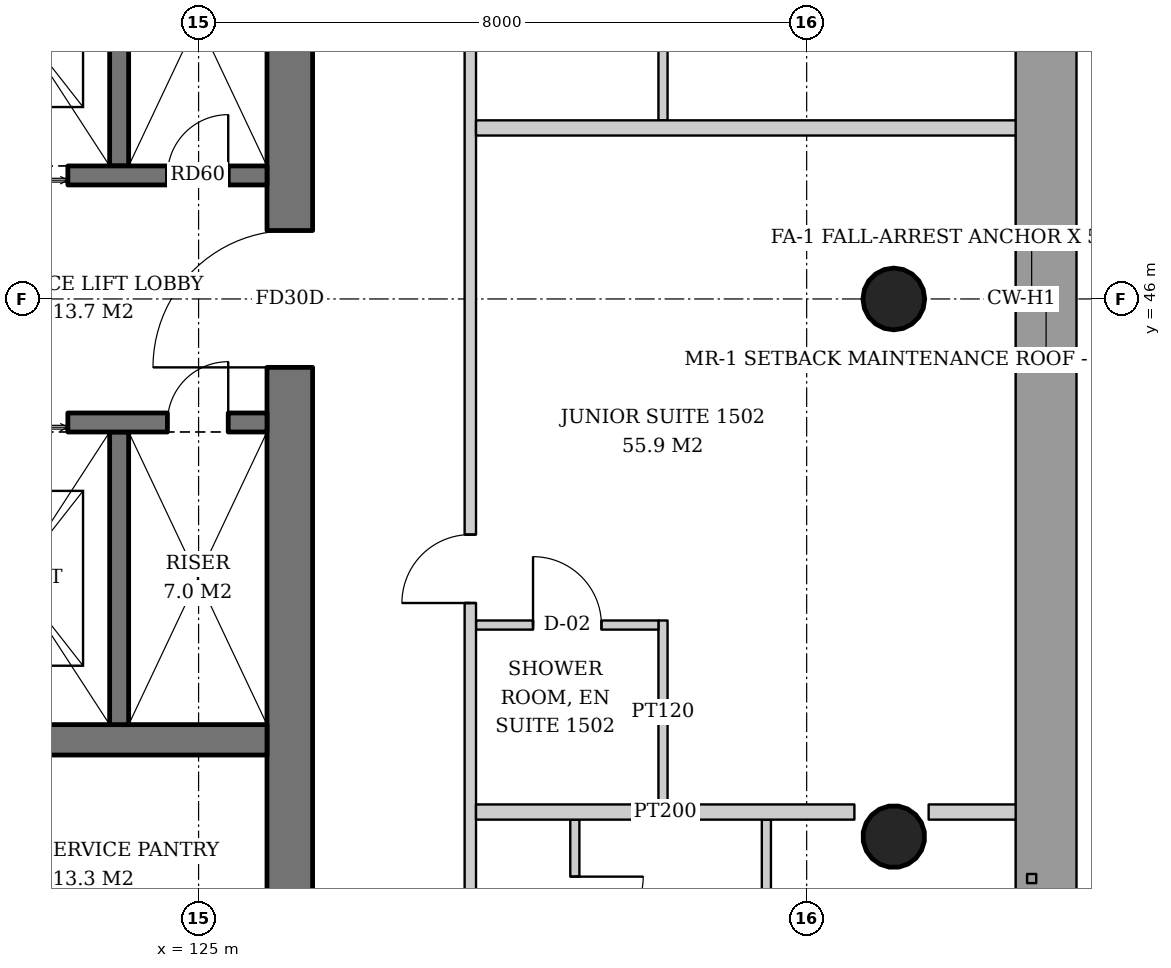
"""IFC4 building model, lengths in metres.
Left out: names, types, materials, properties, quantities, classifications, styles, units other than length and angle.
Written with IfcOpenShell. Run it as: python <this file> out.ifc"""

import sys

from ifc_helpers import new_model, si_unit, direction, frame, frame_2d, origin, origin_2d, place, context, subcontext, project, spatial, rectangle, hollow_circle, extrude, element, fill, save


model = new_model("IFC4")
c1 = context("Model", 3, precision=1e-05, world=origin(), true_north=direction((0.0, 1.0)))
c2 = subcontext(c1, "Body", "Model", "MODEL_VIEW")
j1 = project(units=[si_unit("LENGTHUNIT", "METRE"), si_unit("PLANEANGLEUNIT", "RADIAN")], contexts=[c1])
p1 = place(None, origin())
s1 = spatial("IfcSite", under=j1, at=p1, CompositionType="ELEMENT")
p2 = place(p1, origin())
s2 = spatial("IfcBuilding", under=s1, at=p2, CompositionType="ELEMENT")
p3 = place(p2, frame((0.0, 0.0, 62.8)))
s3 = spatial("IfcBuildingStorey", under=s2, at=p3, CompositionType="ELEMENT", Elevation=62.8)
p4 = place(p3, frame((134.198, 38.901, 0.0), z_axis=(-0.043059584825, 0.021497706284, 0.998841188968), x_axis=(-0.446680166538, -0.894693706707, 0.0)))
e1 = element("IfcColumn", 1, at=p4, inside=s3, PredefinedType="COLUMN", context=c2, shape_type="SweptSolid", body=[
    extrude(hollow_circle(Radius=0.406, WallThickness=0.03, at=origin_2d()), origin(), (0.0, 0.0, 1.0), 3.804),
])
p5 = place(p3, frame((134.198, 46.0, 0.0), z_axis=(-0.043069538298, 0.0, 0.999072076915), x_axis=(0.0, -1.0, 0.0)))
e2 = element("IfcColumn", 2, at=p5, inside=s3, PredefinedType="COLUMN", context=c2, shape_type="SweptSolid", body=[
    extrude(hollow_circle(Radius=0.406, WallThickness=0.03, at=origin_2d()), origin(), (0.0, 0.0, 1.0), 3.803),
])
p6 = place(p3, frame((126.2, 37.1, 0.0), z_axis=(0.0, 0.0, 1.0), x_axis=(0.0, 1.0, 0.0)))
e3 = element("IfcWall", 3, at=p6, inside=s3, PredefinedType="SHEAR", context=c2, shape_type="SweptSolid", body=[
    extrude(rectangle(XDim=17.8, YDim=0.6, at=frame_2d((8.9, 0.0))), origin(), (0.0, 0.0, 1.0), 3.8),
])
p7 = place(p6, frame((8.0, 0.0, 0.0)))
e4 = element("IfcOpeningElement", 4, at=p7, cuts=e3, PredefinedType="OPENING", context=c2, shape_type="SweptSolid", body=[
    extrude(rectangle(XDim=1.8, YDim=2.4, at=frame_2d((0.9, 1.2))), frame((0.0, 0.31, 0.0), z_axis=(0.0, -1.0, 0.0), x_axis=(1.0, 0.0, 0.0)), (0.0, 0.0, 1.0), 0.62),
])
p8 = place(p3, frame((108.1, 40.2, 0.0), z_axis=(0.0, 0.0, 1.0), x_axis=(1.0, 0.0, 0.0)))
e5 = element("IfcWall", 5, at=p8, inside=s3, PredefinedType="SHEAR", context=c2, shape_type="SweptSolid", body=[
    extrude(rectangle(XDim=17.8, YDim=0.4, at=frame_2d((8.9, 0.0))), origin(), (0.0, 0.0, 1.0), 3.8),
])
p9 = place(p3, frame((123.955, 47.75, 0.0), z_axis=(0.0, 0.0, 1.0), x_axis=(0.0, 1.0, 0.0)))
e6 = element("IfcWall", 6, at=p9, inside=s3, PredefinedType="SHEAR", context=c2, shape_type="SweptSolid", body=[
    extrude(rectangle(XDim=3.85, YDim=0.25, at=frame_2d((1.925, 0.0))), origin(), (0.0, 0.0, 1.0), 3.8),
])
p10 = place(p3, frame((121.33, 47.625, 0.0), z_axis=(0.0, 0.0, 1.0), x_axis=(1.0, 0.0, 0.0)))
e7 = element("IfcWall", 7, at=p10, inside=s3, PredefinedType="SHEAR", context=c2, shape_type="SweptSolid", body=[
    extrude(rectangle(XDim=4.57, YDim=0.25, at=frame_2d((2.285, 0.0))), origin(), (0.0, 0.0, 1.0), 3.8),
])
p11 = place(p10, frame((0.55, 0.0, 0.0)))
e8 = element("IfcOpeningElement", 8, at=p11, cuts=e7, PredefinedType="OPENING", context=c2, shape_type="SweptSolid", body=[
    extrude(rectangle(XDim=1.4, YDim=2.4, at=frame_2d((0.7, 1.2))), frame((0.0, 0.135, 0.0), z_axis=(0.0, -1.0, 0.0), x_axis=(1.0, 0.0, 0.0)), (0.0, 0.0, 1.0), 0.27),
])
p12 = place(p10, frame((3.26, 0.0, 0.0)))
e9 = element("IfcOpeningElement", 9, at=p12, cuts=e7, PredefinedType="OPENING", context=c2, shape_type="SweptSolid", body=[
    extrude(rectangle(XDim=0.8, YDim=2.0, at=frame_2d((0.4, 1.0))), frame((0.0, 0.135, 0.0), z_axis=(0.0, -1.0, 0.0), x_axis=(1.0, 0.0, 0.0)), (0.0, 0.0, 1.0), 0.27),
])
p13 = place(p3, frame((123.955, 44.25, 0.0), z_axis=(0.0, 0.0, 1.0), x_axis=(0.0, -1.0, 0.0)))
e10 = element("IfcWall", 10, at=p13, inside=s3, PredefinedType="SHEAR", context=c2, shape_type="SweptSolid", body=[
    extrude(rectangle(XDim=3.85, YDim=0.25, at=frame_2d((1.925, 0.0))), origin(), (0.0, 0.0, 1.0), 3.8),
])
p14 = place(p3, frame((121.33, 44.375, 0.0), z_axis=(0.0, 0.0, 1.0), x_axis=(1.0, 0.0, 0.0)))
e11 = element("IfcWall", 11, at=p14, inside=s3, PredefinedType="SHEAR", context=c2, shape_type="SweptSolid", body=[
    extrude(rectangle(XDim=4.57, YDim=0.25, at=frame_2d((2.285, 0.0))), origin(), (0.0, 0.0, 1.0), 3.8),
])
p15 = place(p14, frame((0.55, 0.0, 0.0)))
e12 = element("IfcOpeningElement", 12, at=p15, cuts=e11, PredefinedType="OPENING", context=c2, shape_type="SweptSolid", body=[
    extrude(rectangle(XDim=1.4, YDim=2.4, at=frame_2d((0.7, 1.2))), frame((0.0, 0.135, 0.0), z_axis=(0.0, -1.0, 0.0), x_axis=(1.0, 0.0, 0.0)), (0.0, 0.0, 1.0), 0.27),
])
p16 = place(p14, frame((3.26, 0.0, 0.0)))
e13 = element("IfcOpeningElement", 13, at=p16, cuts=e11, PredefinedType="OPENING", context=c2, shape_type="SweptSolid", body=[
    extrude(rectangle(XDim=0.8, YDim=2.0, at=frame_2d((0.4, 1.0))), frame((0.0, 0.135, 0.0), z_axis=(0.0, -1.0, 0.0), x_axis=(1.0, 0.0, 0.0)), (0.0, 0.0, 1.0), 0.27),
])
p17 = place(p3, frame((129.95, 39.15, 0.0), z_axis=(0.0, 0.0, 1.0), x_axis=(0.0, -1.0, 0.0)))
e14 = element("IfcWall", 14, at=p17, inside=s3, PredefinedType="PARTITIONING", context=c2, shape_type="SweptSolid", body=[
    extrude(rectangle(XDim=2.58, YDim=0.12, at=frame_2d((1.29, 0.0))), origin(), (0.0, 0.0, 1.0), 2.8),
])
p18 = place(p17, frame((0.75, 0.0, 0.0)))
e15 = element("IfcOpeningElement", 15, at=p18, cuts=e14, PredefinedType="OPENING", context=c2, shape_type="SweptSolid", body=[
    extrude(rectangle(XDim=0.9, YDim=2.1, at=frame_2d((0.45, 1.05))), frame((0.0, 0.07, 0.0), z_axis=(0.0, -1.0, 0.0), x_axis=(1.0, 0.0, 0.0)), (0.0, 0.0, 1.0), 0.14),
])
p19 = place(p3, frame((132.47, 39.15, 0.0), z_axis=(0.0, 0.0, 1.0), x_axis=(0.0, -1.0, 0.0)))
e16 = element("IfcWall", 16, at=p19, inside=s3, PredefinedType="PARTITIONING", context=c2, shape_type="SweptSolid", body=[
    extrude(rectangle(XDim=2.58, YDim=0.12, at=frame_2d((1.29, 0.0))), origin(), (0.0, 0.0, 1.0), 2.8),
])
p20 = place(p3, frame((131.11, 39.35, 0.0), z_axis=(0.0, 0.0, 1.0), x_axis=(0.0, 1.0, 0.0)))
e17 = element("IfcWall", 17, at=p20, inside=s3, PredefinedType="PARTITIONING", context=c2, shape_type="SweptSolid", body=[
    extrude(rectangle(XDim=2.42, YDim=0.12, at=frame_2d((1.21, 0.0))), origin(), (0.0, 0.0, 1.0), 2.847),
])
p21 = place(p3, frame((128.65, 41.71, 0.0), z_axis=(0.0, 0.0, 1.0), x_axis=(1.0, 0.0, 0.0)))
e18 = element("IfcWall", 18, at=p21, inside=s3, PredefinedType="PARTITIONING", context=c2, shape_type="SweptSolid", body=[
    extrude(rectangle(XDim=2.4, YDim=0.12, at=frame_2d((1.2, 0.0))), origin(), (0.0, 0.0, 1.0), 3.6),
])
p22 = place(p21, frame((0.75, 0.0, 0.0)))
e19 = element("IfcOpeningElement", 19, at=p22, cuts=e18, PredefinedType="OPENING", context=c2, shape_type="SweptSolid", body=[
    extrude(rectangle(XDim=0.9, YDim=2.1, at=frame_2d((0.45, 1.05))), frame((0.0, 0.07, 0.0), z_axis=(0.0, -1.0, 0.0), x_axis=(1.0, 0.0, 0.0)), (0.0, 0.0, 1.0), 0.14),
])
p23 = place(p3, frame((131.11, 48.35, 0.0), z_axis=(0.0, 0.0, 1.0), x_axis=(0.0, 1.0, 0.0)))
e20 = element("IfcWall", 20, at=p23, inside=s3, PredefinedType="PARTITIONING", context=c2, shape_type="SweptSolid", body=[
    extrude(rectangle(XDim=2.72, YDim=0.12, at=frame_2d((1.36, 0.0))), origin(), (0.0, 0.0, 1.0), 2.847),
])
p24 = place(p3, frame((128.575, 34.35, 0.0), z_axis=(0.0, 0.0, 1.0), x_axis=(0.0, 1.0, 0.0)))
e21 = element("IfcWall", 21, at=p24, inside=s3, PredefinedType="PARTITIONING", context=c2, shape_type="SweptSolid", body=[
    extrude(rectangle(XDim=23.15, YDim=0.15, at=frame_2d((11.575, 0.0))), origin(), (0.0, 0.0, 1.0), 2.8),
])
p25 = place(p24, frame((2.025, 0.0, 0.0)))
e22 = element("IfcOpeningElement", 22, at=p25, cuts=e21, PredefinedType="OPENING", context=c2, shape_type="SweptSolid", body=[
    extrude(rectangle(XDim=0.9, YDim=2.1, at=frame_2d((0.45, 1.05))), frame((0.0, 0.085, 0.0), z_axis=(0.0, -1.0, 0.0), x_axis=(1.0, 0.0, 0.0)), (0.0, 0.0, 1.0), 0.17),
])
p26 = place(p24, frame((7.65, 0.0, 0.0)))
e23 = element("IfcOpeningElement", 23, at=p26, cuts=e21, PredefinedType="OPENING", context=c2, shape_type="SweptSolid", body=[
    extrude(rectangle(XDim=0.9, YDim=2.1, at=frame_2d((0.45, 1.05))), frame((0.0, 0.085, 0.0), z_axis=(0.0, -1.0, 0.0), x_axis=(1.0, 0.0, 0.0)), (0.0, 0.0, 1.0), 0.17),
])
p27 = place(p24, frame((16.9, 0.0, 0.0)))
e24 = element("IfcOpeningElement", 24, at=p27, cuts=e21, PredefinedType="OPENING", context=c2, shape_type="SweptSolid", body=[
    extrude(rectangle(XDim=0.9, YDim=2.1, at=frame_2d((0.45, 1.05))), frame((0.0, 0.085, 0.0), z_axis=(0.0, -1.0, 0.0), x_axis=(1.0, 0.0, 0.0)), (0.0, 0.0, 1.0), 0.17),
])
p28 = place(p3, frame((128.65, 39.25, 0.0), z_axis=(0.0, 0.0, 1.0), x_axis=(1.0, 0.0, 0.0)))
e25 = element("IfcWall", 25, at=p28, inside=s3, PredefinedType="PARTITIONING", context=c2, shape_type="SweptSolid", body=[
    extrude(rectangle(XDim=4.978, YDim=0.2, at=frame_2d((2.489, 0.0))), origin(), (0.0, 0.0, 1.0), 3.6),
])
p29 = place(p3, frame((134.605, 39.25, 0.0), z_axis=(0.0, 0.0, 1.0), x_axis=(1.0, 0.0, 0.0)))
e26 = element("IfcWall", 26, at=p29, inside=s3, PredefinedType="PARTITIONING", context=c2, shape_type="SweptSolid", body=[
    extrude(rectangle(XDim=1.185, YDim=0.2, at=frame_2d((0.593, 0.0))), origin(), (0.0, 0.0, 1.0), 3.6),
])
p30 = place(p3, frame((128.65, 48.25, 0.0), z_axis=(0.0, 0.0, 1.0), x_axis=(1.0, 0.0, 0.0)))
e27 = element("IfcWall", 27, at=p30, inside=s3, PredefinedType="PARTITIONING", context=c2, shape_type="SweptSolid", body=[
    extrude(rectangle(XDim=7.14, YDim=0.2, at=frame_2d((3.57, 0.0))), origin(), (0.0, 0.0, 1.0), 3.05),
])
p31 = place(p11, origin())
e28 = element("IfcDoor", 28, at=p31, inside=s3, OperationType="DOUBLE_DOOR_SLIDING", PredefinedType="DOOR", context=c2, shape_type="SweptSolid", body=[
    extrude(rectangle(XDim=1.4, YDim=2.4, at=frame_2d((0.7, 1.2))), frame((0.0, 0.025, 0.0), z_axis=(0.0, -1.0, 0.0), x_axis=(1.0, 0.0, 0.0)), (0.0, 0.0, 1.0), 0.05),
])
fill(e8, e28)
p32 = place(p12, origin())
e29 = element("IfcDoor", 29, at=p32, inside=s3, OperationType="SINGLE_SWING_RIGHT", PredefinedType="DOOR", context=c2, shape_type="SweptSolid", body=[
    extrude(rectangle(XDim=0.8, YDim=2.0, at=frame_2d((0.4, 1.0))), frame((0.0, 0.025, 0.0), z_axis=(0.0, -1.0, 0.0), x_axis=(1.0, 0.0, 0.0)), (0.0, 0.0, 1.0), 0.05),
])
fill(e9, e29)
p33 = place(p15, origin())
e30 = element("IfcDoor", 30, at=p33, inside=s3, OperationType="DOUBLE_DOOR_SLIDING", PredefinedType="DOOR", context=c2, shape_type="SweptSolid", body=[
    extrude(rectangle(XDim=1.4, YDim=2.4, at=frame_2d((0.7, 1.2))), frame((0.0, 0.025, 0.0), z_axis=(0.0, -1.0, 0.0), x_axis=(1.0, 0.0, 0.0)), (0.0, 0.0, 1.0), 0.05),
])
fill(e12, e30)
p34 = place(p16, origin())
e31 = element("IfcDoor", 31, at=p34, inside=s3, OperationType="SINGLE_SWING_RIGHT", PredefinedType="DOOR", context=c2, shape_type="SweptSolid", body=[
    extrude(rectangle(XDim=0.8, YDim=2.0, at=frame_2d((0.4, 1.0))), frame((0.0, 0.025, 0.0), z_axis=(0.0, -1.0, 0.0), x_axis=(1.0, 0.0, 0.0)), (0.0, 0.0, 1.0), 0.05),
])
fill(e13, e31)
p35 = place(p7, origin())
e32 = element("IfcDoor", 32, at=p35, inside=s3, OperationType="DOUBLE_DOOR_SINGLE_SWING", PredefinedType="DOOR", context=c2, shape_type="SweptSolid", body=[
    extrude(rectangle(XDim=1.8, YDim=2.4, at=frame_2d((0.9, 1.2))), frame((0.0, 0.025, 0.0), z_axis=(0.0, -1.0, 0.0), x_axis=(1.0, 0.0, 0.0)), (0.0, 0.0, 1.0), 0.05),
])
fill(e4, e32)
p36 = place(p18, origin())
e33 = element("IfcDoor", 33, at=p36, inside=s3, OperationType="SINGLE_SWING_LEFT", PredefinedType="DOOR", context=c2, shape_type="SweptSolid", body=[
    extrude(rectangle(XDim=0.9, YDim=2.1, at=frame_2d((0.45, 1.05))), frame((0.0, 0.025, 0.0), z_axis=(0.0, -1.0, 0.0), x_axis=(1.0, 0.0, 0.0)), (0.0, 0.0, 1.0), 0.05),
])
fill(e15, e33)
p37 = place(p22, origin())
e34 = element("IfcDoor", 34, at=p37, inside=s3, OperationType="SINGLE_SWING_LEFT", PredefinedType="DOOR", context=c2, shape_type="SweptSolid", body=[
    extrude(rectangle(XDim=0.9, YDim=2.1, at=frame_2d((0.45, 1.05))), frame((0.0, 0.025, 0.0), z_axis=(0.0, -1.0, 0.0), x_axis=(1.0, 0.0, 0.0)), (0.0, 0.0, 1.0), 0.05),
])
fill(e19, e34)
p38 = place(p26, origin())
e35 = element("IfcDoor", 35, at=p38, inside=s3, OperationType="SINGLE_SWING_LEFT", PredefinedType="DOOR", context=c2, shape_type="SweptSolid", body=[
    extrude(rectangle(XDim=0.9, YDim=2.1, at=frame_2d((0.45, 1.05))), frame((0.0, 0.025, 0.0), z_axis=(0.0, -1.0, 0.0), x_axis=(1.0, 0.0, 0.0)), (0.0, 0.0, 1.0), 0.05),
])
fill(e23, e35)
save(model, sys.argv[1])
